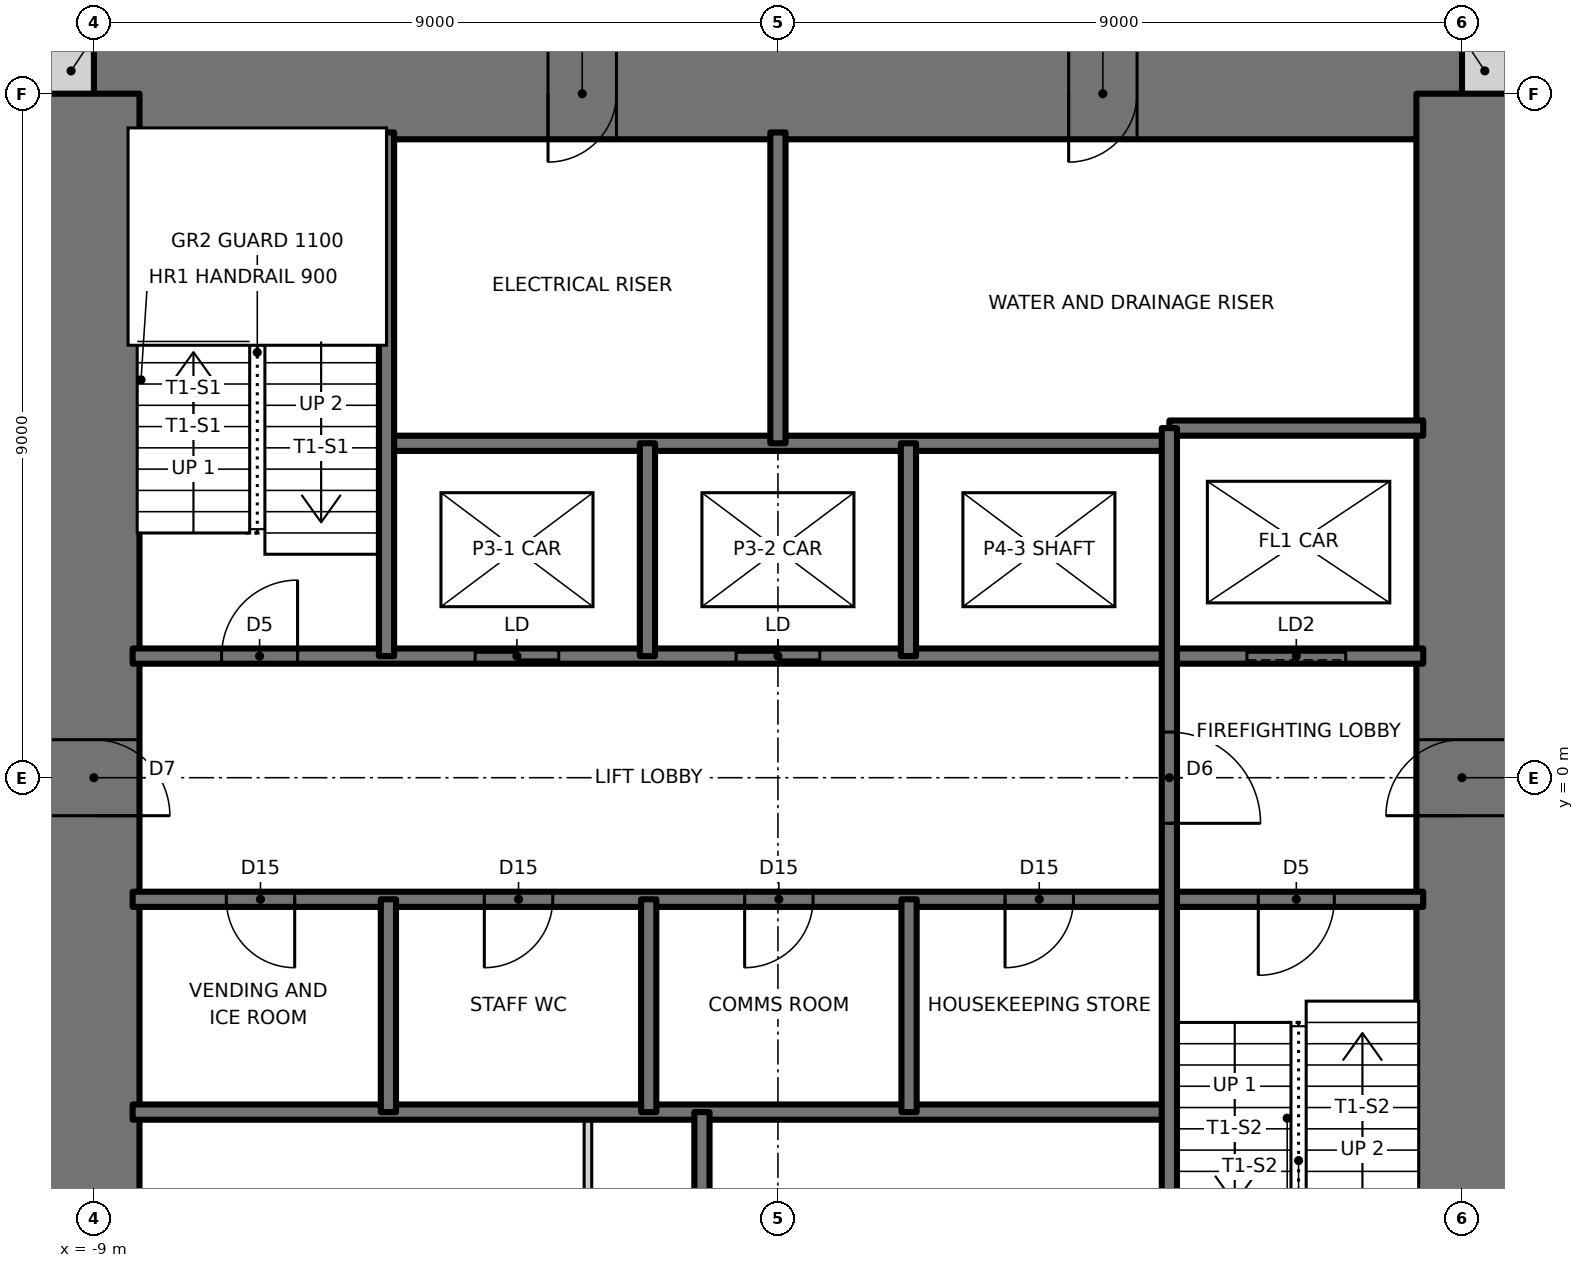
"""IFC4 building model, lengths in metres.
Left out: names, types, materials, properties, quantities, classifications, styles, units other than length and angle.
Written with IfcOpenShell. Run it as: python <this file> out.ifc"""

import sys

from ifc_helpers import new_model, si_unit, direction, frame, frame_2d, origin, place, context, subcontext, project, spatial, rectangle, extrude, element, fill, save


model = new_model("IFC4")
c1 = context("Model", 3, precision=1e-05, world=origin(), true_north=direction((0.0, 1.0)))
c2 = subcontext(c1, "Body", "Model", "MODEL_VIEW")
j1 = project(units=[si_unit("LENGTHUNIT", "METRE"), si_unit("PLANEANGLEUNIT", "RADIAN")], contexts=[c1])
p1 = place(None, origin())
s1 = spatial("IfcSite", under=j1, at=p1, CompositionType="ELEMENT")
p2 = place(p1, origin())
s2 = spatial("IfcBuilding", under=s1, at=p2, CompositionType="ELEMENT")
p3 = place(p2, frame((0.0, 0.0, 177.5)))
s3 = spatial("IfcBuildingStorey", under=s2, at=p3, CompositionType="ELEMENT", Elevation=177.5)
for number, where, z_axis, x_axis in (
    (1, (9.0, 9.3, 0.0), (0.0, 0.0, 1.0), (1.0, 0.0, 0.0)),
    (2, (-9.6, 9.3, 0.0), (0.0, 0.0, 1.0), (1.0, 0.0, 0.0)),
):
    element("IfcWall", number, at=place(p3, frame(where, z_axis=z_axis, x_axis=x_axis)), inside=s3, PredefinedType="SOLIDWALL", context=c2, shape_type="SweptSolid", body=[
        extrude(rectangle(XDim=0.6, YDim=0.6, at=frame_2d((0.3, 0.0))), origin(), (0.0, 0.0, 1.0), 3.5),
    ])
p4 = place(p3, frame((9.0, 9.0, 0.0), z_axis=(0.0, 0.0, 1.0), x_axis=(-1.0, 0.0, 0.0)))
e3 = element("IfcWall", 3, at=p4, inside=s3, PredefinedType="SHEAR", context=c2, shape_type="SweptSolid", body=[
    extrude(rectangle(XDim=18.0, YDim=1.2, at=frame_2d((9.0, 0.0))), origin(), (0.0, 0.0, 1.0), 3.5),
])
p5 = place(p4, frame((11.125, 0.0, 0.0)))
e4 = element("IfcOpeningElement", 4, at=p5, cuts=e3, PredefinedType="OPENING", context=c2, shape_type="SweptSolid", body=[
    extrude(rectangle(XDim=0.9, YDim=2.1, at=frame_2d((0.45, 1.05))), frame((0.0, 0.61, 0.0), z_axis=(0.0, -1.0, 0.0), x_axis=(1.0, 0.0, 0.0)), (0.0, 0.0, 1.0), 1.22),
])
p6 = place(p4, frame((4.275, 0.0, 0.0)))
e5 = element("IfcOpeningElement", 5, at=p6, cuts=e3, PredefinedType="OPENING", context=c2, shape_type="SweptSolid", body=[
    extrude(rectangle(XDim=0.9, YDim=2.1, at=frame_2d((0.45, 1.05))), frame((0.0, 0.61, 0.0), z_axis=(0.0, -1.0, 0.0), x_axis=(1.0, 0.0, 0.0)), (0.0, 0.0, 1.0), 1.22),
])
p7 = place(p3, frame((9.0, -9.0, 0.0), z_axis=(0.0, 0.0, 1.0), x_axis=(0.0, 1.0, 0.0)))
e6 = element("IfcWall", 6, at=p7, inside=s3, PredefinedType="SHEAR", context=c2, shape_type="SweptSolid", body=[
    extrude(rectangle(XDim=18.0, YDim=1.2, at=frame_2d((9.0, 0.0))), origin(), (0.0, 0.0, 1.0), 3.5),
])
p8 = place(p7, frame((8.5, 0.0, 0.0)))
e7 = element("IfcOpeningElement", 7, at=p8, cuts=e6, PredefinedType="OPENING", context=c2, shape_type="SweptSolid", body=[
    extrude(rectangle(XDim=1.0, YDim=2.1, at=frame_2d((0.5, 1.05))), frame((0.0, 0.61, 0.0), z_axis=(0.0, -1.0, 0.0), x_axis=(1.0, 0.0, 0.0)), (0.0, 0.0, 1.0), 1.22),
])
p9 = place(p3, frame((-9.0, 9.0, 0.0), z_axis=(0.0, 0.0, 1.0), x_axis=(0.0, -1.0, 0.0)))
e8 = element("IfcWall", 8, at=p9, inside=s3, PredefinedType="SHEAR", context=c2, shape_type="SweptSolid", body=[
    extrude(rectangle(XDim=18.0, YDim=1.2, at=frame_2d((9.0, 0.0))), origin(), (0.0, 0.0, 1.0), 3.5),
])
p10 = place(p9, frame((8.5, 0.0, 0.0)))
e9 = element("IfcOpeningElement", 9, at=p10, cuts=e8, PredefinedType="OPENING", context=c2, shape_type="SweptSolid", body=[
    extrude(rectangle(XDim=1.0, YDim=2.1, at=frame_2d((0.5, 1.05))), frame((0.0, 0.61, 0.0), z_axis=(0.0, -1.0, 0.0), x_axis=(1.0, 0.0, 0.0)), (0.0, 0.0, 1.0), 1.22),
])
p11 = place(p3, frame((-8.49, -4.4, 0.0), z_axis=(0.0, 0.0, 1.0), x_axis=(1.0, 0.0, 0.0)))
e10 = element("IfcWall", 10, at=p11, inside=s3, PredefinedType="SOLIDWALL", context=c2, shape_type="SweptSolid", body=[
    extrude(rectangle(XDim=13.64, YDim=0.2, at=frame_2d((6.82, 0.0))), origin(), (0.0, 0.0, 1.0), 3.5),
])
p12 = place(p3, frame((-8.49, -1.6, 0.0), z_axis=(0.0, 0.0, 1.0), x_axis=(1.0, 0.0, 0.0)))
e11 = element("IfcWall", 11, at=p12, inside=s3, PredefinedType="SOLIDWALL", context=c2, shape_type="SweptSolid", body=[
    extrude(rectangle(XDim=16.98, YDim=0.2, at=frame_2d((8.49, 0.0))), origin(), (0.0, 0.0, 1.0), 3.5),
])
p13 = place(p12, frame((14.81, 0.0, 0.0)))
e12 = element("IfcOpeningElement", 12, at=p13, cuts=e11, PredefinedType="OPENING", context=c2, shape_type="SweptSolid", body=[
    extrude(rectangle(XDim=1.0, YDim=2.1, at=frame_2d((0.5, 1.05))), frame((0.0, 0.11, 0.0), z_axis=(0.0, -1.0, 0.0), x_axis=(1.0, 0.0, 0.0)), (0.0, 0.0, 1.0), 0.22),
])
p14 = place(p12, frame((1.232, 0.0, 0.0)))
e13 = element("IfcOpeningElement", 13, at=p14, cuts=e11, PredefinedType="OPENING", context=c2, shape_type="SweptSolid", body=[
    extrude(rectangle(XDim=0.9, YDim=2.1, at=frame_2d((0.45, 1.05))), frame((0.0, 0.11, 0.0), z_axis=(0.0, -1.0, 0.0), x_axis=(1.0, 0.0, 0.0)), (0.0, 0.0, 1.0), 0.22),
])
p15 = place(p12, frame((4.627, 0.0, 0.0)))
e14 = element("IfcOpeningElement", 14, at=p15, cuts=e11, PredefinedType="OPENING", context=c2, shape_type="SweptSolid", body=[
    extrude(rectangle(XDim=0.9, YDim=2.1, at=frame_2d((0.45, 1.05))), frame((0.0, 0.11, 0.0), z_axis=(0.0, -1.0, 0.0), x_axis=(1.0, 0.0, 0.0)), (0.0, 0.0, 1.0), 0.22),
])
p16 = place(p12, frame((8.052, 0.0, 0.0)))
e15 = element("IfcOpeningElement", 15, at=p16, cuts=e11, PredefinedType="OPENING", context=c2, shape_type="SweptSolid", body=[
    extrude(rectangle(XDim=0.9, YDim=2.1, at=frame_2d((0.45, 1.05))), frame((0.0, 0.11, 0.0), z_axis=(0.0, -1.0, 0.0), x_axis=(1.0, 0.0, 0.0)), (0.0, 0.0, 1.0), 0.22),
])
p17 = place(p12, frame((11.478, 0.0, 0.0)))
e16 = element("IfcOpeningElement", 16, at=p17, cuts=e11, PredefinedType="OPENING", context=c2, shape_type="SweptSolid", body=[
    extrude(rectangle(XDim=0.9, YDim=2.1, at=frame_2d((0.45, 1.05))), frame((0.0, 0.11, 0.0), z_axis=(0.0, -1.0, 0.0), x_axis=(1.0, 0.0, 0.0)), (0.0, 0.0, 1.0), 0.22),
])
p18 = place(p3, frame((-8.49, 1.6, 0.0), z_axis=(0.0, 0.0, 1.0), x_axis=(1.0, 0.0, 0.0)))
e17 = element("IfcWall", 17, at=p18, inside=s3, PredefinedType="SOLIDWALL", context=c2, shape_type="SweptSolid", body=[
    extrude(rectangle(XDim=16.98, YDim=0.2, at=frame_2d((8.49, 0.0))), origin(), (0.0, 0.0, 1.0), 3.5),
])
p19 = place(p18, frame((1.17, 0.0, 0.0)))
e18 = element("IfcOpeningElement", 18, at=p19, cuts=e17, PredefinedType="OPENING", context=c2, shape_type="SweptSolid", body=[
    extrude(rectangle(XDim=1.0, YDim=2.1, at=frame_2d((0.5, 1.05))), frame((0.0, 0.11, 0.0), z_axis=(0.0, -1.0, 0.0), x_axis=(1.0, 0.0, 0.0)), (0.0, 0.0, 1.0), 0.22),
])
p20 = place(p18, frame((4.506, 0.0, 0.0)))
e19 = element("IfcOpeningElement", 19, at=p20, cuts=e17, PredefinedType="OPENING", context=c2, shape_type="SweptSolid", body=[
    extrude(rectangle(XDim=1.1, YDim=2.1, at=frame_2d((0.55, 1.05))), frame((0.0, 0.11, 0.0), z_axis=(0.0, -1.0, 0.0), x_axis=(1.0, 0.0, 0.0)), (0.0, 0.0, 1.0), 0.22),
])
p21 = place(p18, frame((7.94, 0.0, 0.0)))
e20 = element("IfcOpeningElement", 20, at=p21, cuts=e17, PredefinedType="OPENING", context=c2, shape_type="SweptSolid", body=[
    extrude(rectangle(XDim=1.1, YDim=2.1, at=frame_2d((0.55, 1.05))), frame((0.0, 0.11, 0.0), z_axis=(0.0, -1.0, 0.0), x_axis=(1.0, 0.0, 0.0)), (0.0, 0.0, 1.0), 0.22),
])
p22 = place(p18, frame((14.66, 0.0, 0.0)))
e21 = element("IfcOpeningElement", 21, at=p22, cuts=e17, PredefinedType="OPENING", context=c2, shape_type="SweptSolid", body=[
    extrude(rectangle(XDim=1.3, YDim=2.1, at=frame_2d((0.65, 1.05))), frame((0.0, 0.11, 0.0), z_axis=(0.0, -1.0, 0.0), x_axis=(1.0, 0.0, 0.0)), (0.0, 0.0, 1.0), 0.22),
])
p23 = place(p3, frame((-5.15, 4.4, 0.0), z_axis=(0.0, 0.0, 1.0), x_axis=(1.0, 0.0, 0.0)))
e22 = element("IfcWall", 22, at=p23, inside=s3, PredefinedType="SOLIDWALL", context=c2, shape_type="SweptSolid", body=[
    extrude(rectangle(XDim=10.3, YDim=0.2, at=frame_2d((5.15, 0.0))), origin(), (0.0, 0.0, 1.0), 3.5),
])
p24 = place(p3, frame((5.15, 4.6, 0.0), z_axis=(0.0, 0.0, 1.0), x_axis=(1.0, 0.0, 0.0)))
e23 = element("IfcWall", 23, at=p24, inside=s3, PredefinedType="SOLIDWALL", context=c2, shape_type="SweptSolid", body=[
    extrude(rectangle(XDim=3.34, YDim=0.2, at=frame_2d((1.67, 0.0))), origin(), (0.0, 0.0, 1.0), 3.5),
])
p25 = place(p3, frame((5.15, -8.49, 0.0), z_axis=(0.0, 0.0, 1.0), x_axis=(0.0, 1.0, 0.0)))
e24 = element("IfcWall", 24, at=p25, inside=s3, PredefinedType="SOLIDWALL", context=c2, shape_type="SweptSolid", body=[
    extrude(rectangle(XDim=13.09, YDim=0.2, at=frame_2d((6.545, 0.0))), origin(), (0.0, 0.0, 1.0), 3.5),
])
p26 = place(p25, frame((7.89, 0.0, 0.0)))
e25 = element("IfcOpeningElement", 25, at=p26, cuts=e24, PredefinedType="OPENING", context=c2, shape_type="SweptSolid", body=[
    extrude(rectangle(XDim=1.2, YDim=2.1, at=frame_2d((0.6, 1.05))), frame((0.0, 0.11, 0.0), z_axis=(0.0, -1.0, 0.0), x_axis=(1.0, 0.0, 0.0)), (0.0, 0.0, 1.0), 0.22),
])
for number, where, z_axis, x_axis in (
    (26, (1.725, -4.4, 0.0), (0.0, 0.0, 1.0), (0.0, 1.0, 0.0)),
    (27, (1.717, 1.6, 0.0), (0.0, 0.0, 1.0), (0.0, 1.0, 0.0)),
):
    element("IfcWall", number, at=place(p3, frame(where, z_axis=z_axis, x_axis=x_axis)), inside=s3, PredefinedType="SOLIDWALL", context=c2, shape_type="SweptSolid", body=[
        extrude(rectangle(XDim=2.8, YDim=0.2, at=frame_2d((1.4, 0.0))), origin(), (0.0, 0.0, 1.0), 3.5),
    ])
for number, where, z_axis, x_axis in (
    (28, (0.0, 4.4, 0.0), (0.0, 0.0, 1.0), (0.0, 1.0, 0.0)),
    (29, (-1.0, -8.49, 0.0), (0.0, 0.0, 1.0), (0.0, 1.0, 0.0)),
):
    element("IfcWall", number, at=place(p3, frame(where, z_axis=z_axis, x_axis=x_axis)), inside=s3, PredefinedType="SOLIDWALL", context=c2, shape_type="SweptSolid", body=[
        extrude(rectangle(XDim=4.09, YDim=0.2, at=frame_2d((2.045, 0.0))), origin(), (0.0, 0.0, 1.0), 3.5),
    ])
for number, where, z_axis, x_axis in (
    (30, (-1.7, -4.4, 0.0), (0.0, 0.0, 1.0), (0.0, 1.0, 0.0)),
    (31, (-1.717, 1.6, 0.0), (0.0, 0.0, 1.0), (0.0, 1.0, 0.0)),
):
    element("IfcWall", number, at=place(p3, frame(where, z_axis=z_axis, x_axis=x_axis)), inside=s3, PredefinedType="SOLIDWALL", context=c2, shape_type="SweptSolid", body=[
        extrude(rectangle(XDim=2.8, YDim=0.2, at=frame_2d((1.4, 0.0))), origin(), (0.0, 0.0, 1.0), 3.5),
    ])
p27 = place(p3, frame((-2.5, -8.49, 0.0), z_axis=(0.0, 0.0, 1.0), x_axis=(0.0, 1.0, 0.0)))
e32 = element("IfcWall", 32, at=p27, inside=s3, PredefinedType="PARTITIONING", context=c2, shape_type="SweptSolid", body=[
    extrude(rectangle(XDim=4.09, YDim=0.1, at=frame_2d((2.045, 0.0))), origin(), (0.0, 0.0, 1.0), 3.3),
])
p28 = place(p27, frame((1.595, 0.0, 0.0)))
e33 = element("IfcOpeningElement", 33, at=p28, cuts=e32, PredefinedType="OPENING", context=c2, shape_type="SweptSolid", body=[
    extrude(rectangle(XDim=0.9, YDim=2.1, at=frame_2d((0.45, 1.05))), frame((0.0, 0.06, 0.0), z_axis=(0.0, -1.0, 0.0), x_axis=(1.0, 0.0, 0.0)), (0.0, 0.0, 1.0), 0.12),
])
p29 = place(p3, frame((-5.125, -4.4, 0.0), z_axis=(0.0, 0.0, 1.0), x_axis=(0.0, 1.0, 0.0)))
e34 = element("IfcWall", 34, at=p29, inside=s3, PredefinedType="SOLIDWALL", context=c2, shape_type="SweptSolid", body=[
    extrude(rectangle(XDim=2.8, YDim=0.2, at=frame_2d((1.4, 0.0))), origin(), (0.0, 0.0, 1.0), 3.5),
])
p30 = place(p3, frame((-5.15, 1.6, 0.0), z_axis=(0.0, 0.0, 1.0), x_axis=(0.0, 1.0, 0.0)))
e35 = element("IfcWall", 35, at=p30, inside=s3, PredefinedType="SOLIDWALL", context=c2, shape_type="SweptSolid", body=[
    extrude(rectangle(XDim=6.89, YDim=0.2, at=frame_2d((3.445, 0.0))), origin(), (0.0, 0.0, 1.0), 3.5),
])
p31 = place(p19, origin())
e36 = element("IfcDoor", 36, at=p31, inside=s3, OperationType="SINGLE_SWING_RIGHT", PredefinedType="DOOR", context=c2, shape_type="SweptSolid", body=[
    extrude(rectangle(XDim=1.0, YDim=2.1, at=frame_2d((0.5, 1.05))), frame((0.0, 0.025, 0.0), z_axis=(0.0, -1.0, 0.0), x_axis=(1.0, 0.0, 0.0)), (0.0, 0.0, 1.0), 0.05),
])
fill(e18, e36)
p32 = place(p13, frame((1.0, 0.0, 0.0), z_axis=(0.0, 0.0, 1.0), x_axis=(-1.0, 0.0, 0.0)))
e37 = element("IfcDoor", 37, at=p32, inside=s3, OperationType="SINGLE_SWING_RIGHT", PredefinedType="DOOR", context=c2, shape_type="SweptSolid", body=[
    extrude(rectangle(XDim=1.0, YDim=2.1, at=frame_2d((0.5, 1.05))), frame((0.0, 0.025, 0.0), z_axis=(0.0, -1.0, 0.0), x_axis=(1.0, 0.0, 0.0)), (0.0, 0.0, 1.0), 0.05),
])
fill(e12, e37)
p33 = place(p26, frame((1.2, 0.0, 0.0), z_axis=(0.0, 0.0, 1.0), x_axis=(-1.0, 0.0, 0.0)))
e38 = element("IfcDoor", 38, at=p33, inside=s3, OperationType="SINGLE_SWING_RIGHT", PredefinedType="DOOR", context=c2, shape_type="SweptSolid", body=[
    extrude(rectangle(XDim=1.2, YDim=2.1, at=frame_2d((0.6, 1.05))), frame((0.0, 0.025, 0.0), z_axis=(0.0, -1.0, 0.0), x_axis=(1.0, 0.0, 0.0)), (0.0, 0.0, 1.0), 0.05),
])
fill(e25, e38)
p34 = place(p14, frame((0.9, 0.0, 0.0), z_axis=(0.0, 0.0, 1.0), x_axis=(-1.0, 0.0, 0.0)))
e39 = element("IfcDoor", 39, at=p34, inside=s3, OperationType="SINGLE_SWING_LEFT", PredefinedType="DOOR", context=c2, shape_type="SweptSolid", body=[
    extrude(rectangle(XDim=0.9, YDim=2.1, at=frame_2d((0.45, 1.05))), frame((0.0, 0.025, 0.0), z_axis=(0.0, -1.0, 0.0), x_axis=(1.0, 0.0, 0.0)), (0.0, 0.0, 1.0), 0.05),
])
fill(e13, e39)
p35 = place(p15, frame((0.9, 0.0, 0.0), z_axis=(0.0, 0.0, 1.0), x_axis=(-1.0, 0.0, 0.0)))
e40 = element("IfcDoor", 40, at=p35, inside=s3, OperationType="SINGLE_SWING_RIGHT", PredefinedType="DOOR", context=c2, shape_type="SweptSolid", body=[
    extrude(rectangle(XDim=0.9, YDim=2.1, at=frame_2d((0.45, 1.05))), frame((0.0, 0.025, 0.0), z_axis=(0.0, -1.0, 0.0), x_axis=(1.0, 0.0, 0.0)), (0.0, 0.0, 1.0), 0.05),
])
fill(e14, e40)
p36 = place(p16, frame((0.9, 0.0, 0.0), z_axis=(0.0, 0.0, 1.0), x_axis=(-1.0, 0.0, 0.0)))
e41 = element("IfcDoor", 41, at=p36, inside=s3, OperationType="SINGLE_SWING_RIGHT", PredefinedType="DOOR", context=c2, shape_type="SweptSolid", body=[
    extrude(rectangle(XDim=0.9, YDim=2.1, at=frame_2d((0.45, 1.05))), frame((0.0, 0.025, 0.0), z_axis=(0.0, -1.0, 0.0), x_axis=(1.0, 0.0, 0.0)), (0.0, 0.0, 1.0), 0.05),
])
fill(e15, e41)
p37 = place(p17, frame((0.9, 0.0, 0.0), z_axis=(0.0, 0.0, 1.0), x_axis=(-1.0, 0.0, 0.0)))
e42 = element("IfcDoor", 42, at=p37, inside=s3, OperationType="SINGLE_SWING_RIGHT", PredefinedType="DOOR", context=c2, shape_type="SweptSolid", body=[
    extrude(rectangle(XDim=0.9, YDim=2.1, at=frame_2d((0.45, 1.05))), frame((0.0, 0.025, 0.0), z_axis=(0.0, -1.0, 0.0), x_axis=(1.0, 0.0, 0.0)), (0.0, 0.0, 1.0), 0.05),
])
fill(e16, e42)
p38 = place(p10, origin())
e43 = element("IfcDoor", 43, at=p38, inside=s3, OperationType="SINGLE_SWING_RIGHT", PredefinedType="DOOR", context=c2, shape_type="SweptSolid", body=[
    extrude(rectangle(XDim=1.0, YDim=2.1, at=frame_2d((0.5, 1.05))), frame((0.0, 0.025, 0.0), z_axis=(0.0, -1.0, 0.0), x_axis=(1.0, 0.0, 0.0)), (0.0, 0.0, 1.0), 0.05),
])
fill(e9, e43)
p39 = place(p8, origin())
e44 = element("IfcDoor", 44, at=p39, inside=s3, OperationType="SINGLE_SWING_LEFT", PredefinedType="DOOR", context=c2, shape_type="SweptSolid", body=[
    extrude(rectangle(XDim=1.0, YDim=2.1, at=frame_2d((0.5, 1.05))), frame((0.0, 0.025, 0.0), z_axis=(0.0, -1.0, 0.0), x_axis=(1.0, 0.0, 0.0)), (0.0, 0.0, 1.0), 0.05),
])
fill(e7, e44)
p40 = place(p5, origin())
e45 = element("IfcDoor", 45, at=p40, inside=s3, OperationType="SINGLE_SWING_RIGHT", PredefinedType="DOOR", context=c2, shape_type="SweptSolid", body=[
    extrude(rectangle(XDim=0.9, YDim=2.1, at=frame_2d((0.45, 1.05))), frame((0.0, 0.025, 0.0), z_axis=(0.0, -1.0, 0.0), x_axis=(1.0, 0.0, 0.0)), (0.0, 0.0, 1.0), 0.05),
])
fill(e4, e45)
p41 = place(p6, origin())
e46 = element("IfcDoor", 46, at=p41, inside=s3, OperationType="SINGLE_SWING_RIGHT", PredefinedType="DOOR", context=c2, shape_type="SweptSolid", body=[
    extrude(rectangle(XDim=0.9, YDim=2.1, at=frame_2d((0.45, 1.05))), frame((0.0, 0.025, 0.0), z_axis=(0.0, -1.0, 0.0), x_axis=(1.0, 0.0, 0.0)), (0.0, 0.0, 1.0), 0.05),
])
fill(e5, e46)
p42 = place(p20, origin())
e47 = element("IfcDoor", 47, at=p42, inside=s3, OperationType="DOUBLE_DOOR_SLIDING", PredefinedType="DOOR", context=c2, shape_type="SweptSolid", body=[
    extrude(rectangle(XDim=1.1, YDim=2.1, at=frame_2d((0.55, 1.05))), frame((0.0, 0.025, 0.0), z_axis=(0.0, -1.0, 0.0), x_axis=(1.0, 0.0, 0.0)), (0.0, 0.0, 1.0), 0.05),
])
fill(e19, e47)
p43 = place(p21, origin())
e48 = element("IfcDoor", 48, at=p43, inside=s3, OperationType="DOUBLE_DOOR_SLIDING", PredefinedType="DOOR", context=c2, shape_type="SweptSolid", body=[
    extrude(rectangle(XDim=1.1, YDim=2.1, at=frame_2d((0.55, 1.05))), frame((0.0, 0.025, 0.0), z_axis=(0.0, -1.0, 0.0), x_axis=(1.0, 0.0, 0.0)), (0.0, 0.0, 1.0), 0.05),
])
fill(e20, e48)
p44 = place(p22, origin())
e49 = element("IfcDoor", 49, at=p44, inside=s3, OperationType="SLIDING_TO_LEFT", PredefinedType="DOOR", context=c2, shape_type="SweptSolid", body=[
    extrude(rectangle(XDim=1.3, YDim=2.1, at=frame_2d((0.65, 1.05))), frame((0.0, 0.025, 0.0), z_axis=(0.0, -1.0, 0.0), x_axis=(1.0, 0.0, 0.0)), (0.0, 0.0, 1.0), 0.05),
])
fill(e21, e49)
save(model, sys.argv[1])
